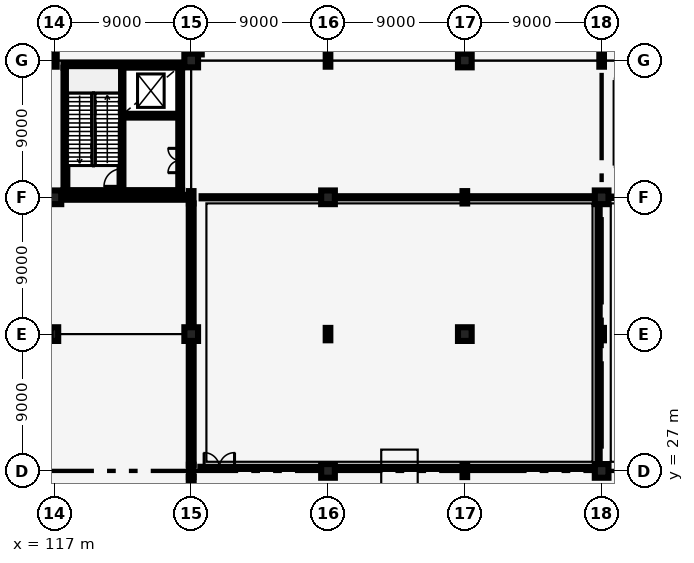
"""IFC4 building model, lengths in metres.
Left out: names, types, materials, properties, quantities, classifications, styles, units other than length and angle.
Written with IfcOpenShell. Run it as: python <this file> out.ifc"""

import sys

from ifc_helpers import new_model, si_unit, direction, frame, frame_2d, origin, origin_2d, place, context, subcontext, project, spatial, rectangle, i_section, extrude, element, fill, save


model = new_model("IFC4")
c1 = context("Model", 3, precision=1e-05, world=origin(), true_north=direction((0.0, 1.0)))
c2 = subcontext(c1, "Body", "Model", "MODEL_VIEW")
j1 = project(units=[si_unit("LENGTHUNIT", "METRE"), si_unit("PLANEANGLEUNIT", "RADIAN")], contexts=[c1])
p1 = place(None, origin())
s1 = spatial("IfcSite", under=j1, at=p1, CompositionType="ELEMENT")
p2 = place(p1, origin())
s2 = spatial("IfcBuilding", under=s1, at=p2, CompositionType="ELEMENT")
p3 = place(p2, origin())
s3 = spatial("IfcBuildingStorey", under=s2, at=p3, CompositionType="ELEMENT", Elevation=0.0)
p4 = place(p3, frame((117.0, 36.0, 0.0), z_axis=(0.0, 0.0, 1.0), x_axis=(1.0, 0.0, 0.0)))
e1 = element("IfcColumn", 1, at=p4, inside=s3, PredefinedType="PILASTER", context=c2, shape_type="SweptSolid", body=[
    extrude(rectangle(XDim=0.5, YDim=0.9, at=origin_2d()), origin(), (0.0, 0.0, 1.0), 5.735),
])
p5 = place(p3, frame((117.0, 45.0, 0.0), z_axis=(0.0, 0.0, 1.0), x_axis=(1.0, 0.0, 0.0)))
e2 = element("IfcColumn", 2, at=p5, inside=s3, PredefinedType="COLUMN", context=c2, shape_type="SweptSolid", body=[
    extrude(rectangle(XDim=0.9, YDim=0.9, at=origin_2d()), origin(), (0.0, 0.0, 1.0), 6.0),
])
for number, where, z_axis, x_axis in (
    (3, (117.0, 54.0, 0.0), (0.0, 0.0, 1.0), (1.0, 0.0, 0.0)),
    (4, (126.0, 27.0, 0.0), (0.0, 0.0, 1.0), (1.0, 0.0, 0.0)),
):
    element("IfcColumn", number, at=place(p3, frame(where, z_axis=z_axis, x_axis=x_axis)), inside=s3, PredefinedType="COLUMN", context=c2, shape_type="SweptSolid", body=[
        extrude(i_section(OverallWidth=0.303, OverallDepth=0.814, WebThickness=0.021, FlangeThickness=0.04, FilletRadius=0.03, at=origin_2d()), origin(), (0.0, 0.0, 1.0), 6.0),
    ])
p6 = place(p3, frame((126.0, 36.0, 0.0), z_axis=(0.0, 0.0, 1.0), x_axis=(1.0, 0.0, 0.0)))
e5 = element("IfcColumn", 5, at=p6, inside=s3, PredefinedType="COLUMN", context=c2, shape_type="SweptSolid", body=[
    extrude(rectangle(XDim=0.9, YDim=0.9, at=origin_2d()), origin(), (0.0, 0.0, 1.0), 6.0),
])
p7 = place(p3, frame((126.0, 45.0, 0.0), z_axis=(0.0, 0.0, 1.0), x_axis=(1.0, 0.0, 0.0)))
e6 = element("IfcColumn", 6, at=p7, inside=s3, PredefinedType="COLUMN", context=c2, shape_type="SweptSolid", body=[
    extrude(i_section(OverallWidth=0.303, OverallDepth=0.814, WebThickness=0.021, FlangeThickness=0.04, FilletRadius=0.03, at=origin_2d()), origin(), (0.0, 0.0, 1.0), 6.0),
])
for number, where, z_axis, x_axis in (
    (7, (126.0, 54.0, 0.0), (0.0, 0.0, 1.0), (1.0, 0.0, 0.0)),
    (8, (135.0, 27.0, 0.0), (0.0, 0.0, 1.0), (1.0, 0.0, 0.0)),
):
    element("IfcColumn", number, at=place(p3, frame(where, z_axis=z_axis, x_axis=x_axis)), inside=s3, PredefinedType="COLUMN", context=c2, shape_type="SweptSolid", body=[
        extrude(rectangle(XDim=0.9, YDim=0.9, at=origin_2d()), origin(), (0.0, 0.0, 1.0), 6.0),
    ])
p8 = place(p3, frame((135.0, 36.0, 0.0), z_axis=(0.0, 0.0, 1.0), x_axis=(1.0, 0.0, 0.0)))
e9 = element("IfcColumn", 9, at=p8, inside=s3, PredefinedType="COLUMN", context=c2, shape_type="SweptSolid", body=[
    extrude(i_section(OverallWidth=0.303, OverallDepth=0.814, WebThickness=0.021, FlangeThickness=0.04, FilletRadius=0.03, at=origin_2d()), origin(), (0.0, 0.0, 1.0), 6.0),
])
p9 = place(p3, frame((135.0, 45.0, 0.0), z_axis=(0.0, 0.0, 1.0), x_axis=(1.0, 0.0, 0.0)))
e10 = element("IfcColumn", 10, at=p9, inside=s3, PredefinedType="COLUMN", context=c2, shape_type="SweptSolid", body=[
    extrude(rectangle(XDim=0.9, YDim=0.9, at=origin_2d()), origin(), (0.0, 0.0, 1.0), 6.0),
])
for number, where, z_axis, x_axis in (
    (11, (135.0, 54.0, 0.0), (0.0, 0.0, 1.0), (1.0, 0.0, 0.0)),
    (12, (144.0, 27.0, 0.0), (0.0, 0.0, 1.0), (1.0, 0.0, 0.0)),
):
    element("IfcColumn", number, at=place(p3, frame(where, z_axis=z_axis, x_axis=x_axis)), inside=s3, PredefinedType="COLUMN", context=c2, shape_type="SweptSolid", body=[
        extrude(i_section(OverallWidth=0.303, OverallDepth=0.814, WebThickness=0.021, FlangeThickness=0.04, FilletRadius=0.03, at=origin_2d()), origin(), (0.0, 0.0, 1.0), 6.0),
    ])
p10 = place(p3, frame((144.0, 36.0, 0.0), z_axis=(0.0, 0.0, 1.0), x_axis=(1.0, 0.0, 0.0)))
e13 = element("IfcColumn", 13, at=p10, inside=s3, PredefinedType="COLUMN", context=c2, shape_type="SweptSolid", body=[
    extrude(rectangle(XDim=0.9, YDim=0.9, at=origin_2d()), origin(), (0.0, 0.0, 1.0), 6.0),
])
p11 = place(p3, frame((144.0, 45.0, 0.0), z_axis=(0.0, 0.0, 1.0), x_axis=(1.0, 0.0, 0.0)))
e14 = element("IfcColumn", 14, at=p11, inside=s3, PredefinedType="COLUMN", context=c2, shape_type="SweptSolid", body=[
    extrude(i_section(OverallWidth=0.303, OverallDepth=0.814, WebThickness=0.021, FlangeThickness=0.04, FilletRadius=0.03, at=origin_2d()), origin(), (0.0, 0.0, 1.0), 6.0),
])
for number, where, z_axis, x_axis in (
    (15, (144.0, 54.0, 0.0), (0.0, 0.0, 1.0), (1.0, 0.0, 0.0)),
    (16, (153.0, 27.0, 0.0), (0.0, 0.0, 1.0), (1.0, 0.0, 0.0)),
):
    element("IfcColumn", number, at=place(p3, frame(where, z_axis=z_axis, x_axis=x_axis)), inside=s3, PredefinedType="COLUMN", context=c2, shape_type="SweptSolid", body=[
        extrude(rectangle(XDim=0.9, YDim=0.9, at=origin_2d()), origin(), (0.0, 0.0, 1.0), 6.0),
    ])
p12 = place(p3, frame((153.0, 36.0, 0.0), z_axis=(0.0, 0.0, 1.0), x_axis=(1.0, 0.0, 0.0)))
e17 = element("IfcColumn", 17, at=p12, inside=s3, PredefinedType="COLUMN", context=c2, shape_type="SweptSolid", body=[
    extrude(i_section(OverallWidth=0.303, OverallDepth=0.814, WebThickness=0.021, FlangeThickness=0.04, FilletRadius=0.03, at=origin_2d()), origin(), (0.0, 0.0, 1.0), 6.0),
])
p13 = place(p3, frame((153.0, 45.0, 0.0), z_axis=(0.0, 0.0, 1.0), x_axis=(1.0, 0.0, 0.0)))
e18 = element("IfcColumn", 18, at=p13, inside=s3, PredefinedType="COLUMN", context=c2, shape_type="SweptSolid", body=[
    extrude(rectangle(XDim=0.9, YDim=0.9, at=origin_2d()), origin(), (0.0, 0.0, 1.0), 6.0),
])
p14 = place(p3, frame((153.0, 54.0, 0.0), z_axis=(0.0, 0.0, 1.0), x_axis=(1.0, 0.0, 0.0)))
e19 = element("IfcColumn", 19, at=p14, inside=s3, PredefinedType="COLUMN", context=c2, shape_type="SweptSolid", body=[
    extrude(i_section(OverallWidth=0.303, OverallDepth=0.814, WebThickness=0.021, FlangeThickness=0.04, FilletRadius=0.03, at=origin_2d()), origin(), (0.0, 0.0, 1.0), 6.0),
])
p15 = place(p3, frame((126.0, 18.445, 0.0), z_axis=(0.0, 0.0, 1.0), x_axis=(0.0, 1.0, 0.0)))
e20 = element("IfcWall", 20, at=p15, inside=s3, PredefinedType="SOLIDWALL", context=c2, shape_type="SweptSolid", body=[
    extrude(rectangle(XDim=8.153, YDim=0.32, at=frame_2d((4.076, 0.0))), origin(), (0.0, 0.0, 1.0), 4.95),
])
p16 = place(p15, frame((2.555, 0.0, 0.85)))
e21 = element("IfcOpeningElement", 21, at=p16, cuts=e20, PredefinedType="OPENING", context=c2, shape_type="SweptSolid", body=[
    extrude(rectangle(XDim=1.4, YDim=2.1, at=frame_2d((0.7, 1.05))), frame((0.0, 0.17, 0.0), z_axis=(0.0, -1.0, 0.0), x_axis=(1.0, 0.0, 0.0)), (0.0, 0.0, 1.0), 0.34),
])
p17 = place(p3, frame((126.0, 27.402, 0.0), z_axis=(0.0, 0.0, 1.0), x_axis=(0.0, 1.0, 0.0)))
e22 = element("IfcWall", 22, at=p17, inside=s3, PredefinedType="SOLIDWALL", context=c2, shape_type="SweptSolid", body=[
    extrude(rectangle(XDim=8.153, YDim=0.32, at=frame_2d((4.076, 0.0))), origin(), (0.0, 0.0, 1.0), 4.95),
])
p18 = place(p17, frame((2.598, 0.0, 0.85)))
e23 = element("IfcOpeningElement", 23, at=p18, cuts=e22, PredefinedType="OPENING", context=c2, shape_type="SweptSolid", body=[
    extrude(rectangle(XDim=2.7, YDim=1.8, at=frame_2d((1.35, 0.9))), frame((0.0, 0.17, 0.0), z_axis=(0.0, -1.0, 0.0), x_axis=(1.0, 0.0, 0.0)), (0.0, 0.0, 1.0), 0.34),
])
p19 = place(p3, frame((126.0, 36.445, 0.0), z_axis=(0.0, 0.0, 1.0), x_axis=(0.0, 1.0, 0.0)))
e24 = element("IfcWall", 24, at=p19, inside=s3, PredefinedType="SOLIDWALL", context=c2, shape_type="SweptSolid", body=[
    extrude(rectangle(XDim=8.153, YDim=0.32, at=frame_2d((4.076, 0.0))), origin(), (0.0, 0.0, 1.0), 4.95),
])
p20 = place(p19, frame((2.555, 0.0, 0.85)))
e25 = element("IfcOpeningElement", 25, at=p20, cuts=e24, PredefinedType="OPENING", context=c2, shape_type="SweptSolid", body=[
    extrude(rectangle(XDim=2.5, YDim=1.8, at=frame_2d((1.25, 0.9))), frame((0.0, 0.17, 0.0), z_axis=(0.0, -1.0, 0.0), x_axis=(1.0, 0.0, 0.0)), (0.0, 0.0, 1.0), 0.34),
])
p21 = place(p3, frame((117.445, 45.0, 0.0), z_axis=(0.0, 0.0, 1.0), x_axis=(1.0, 0.0, 0.0)))
e26 = element("IfcWall", 26, at=p21, inside=s3, PredefinedType="SOLIDWALL", context=c2, shape_type="SweptSolid", body=[
    extrude(rectangle(XDim=8.408, YDim=0.32, at=frame_2d((4.204, 0.0))), origin(), (0.0, 0.0, 1.0), 4.95),
])
p22 = place(p21, frame((2.505, 0.0, 3.3)))
e27 = element("IfcOpeningElement", 27, at=p22, cuts=e26, PredefinedType="OPENING", context=c2, shape_type="SweptSolid", body=[
    extrude(rectangle(XDim=3.1, YDim=1.3, at=frame_2d((1.55, 0.65))), frame((0.0, 0.17, 0.0), z_axis=(0.0, -1.0, 0.0), x_axis=(1.0, 0.0, 0.0)), (0.0, 0.0, 1.0), 0.34),
])
p23 = place(p3, frame((117.725, 45.47, 0.0), z_axis=(0.0, 0.0, 1.0), x_axis=(0.0, 1.0, 0.0)))
e28 = element("IfcWall", 28, at=p23, inside=s3, PredefinedType="SHEAR", context=c2, shape_type="SweptSolid", body=[
    extrude(rectangle(XDim=8.06, YDim=0.25, at=frame_2d((4.03, 0.0))), origin(), (0.0, 0.0, 1.0), 5.71),
])
p24 = place(p3, frame((125.275, 45.47, 0.0), z_axis=(0.0, 0.0, 1.0), x_axis=(0.0, 1.0, 0.0)))
e29 = element("IfcWall", 29, at=p24, inside=s3, PredefinedType="SHEAR", context=c2, shape_type="SweptSolid", body=[
    extrude(rectangle(XDim=8.06, YDim=0.25, at=frame_2d((4.03, 0.0))), origin(), (0.0, 0.0, 1.0), 5.71),
])
p25 = place(p24, frame((1.15, 0.0, 0.0)))
e30 = element("IfcOpeningElement", 30, at=p25, cuts=e29, PredefinedType="OPENING", context=c2, shape_type="SweptSolid", body=[
    extrude(rectangle(XDim=1.6, YDim=2.2, at=frame_2d((0.8, 1.1))), frame((0.0, 0.135, 0.0), z_axis=(0.0, -1.0, 0.0), x_axis=(1.0, 0.0, 0.0)), (0.0, 0.0, 1.0), 0.27),
])
for number, where, z_axis, x_axis in (
    (31, (117.6, 45.345, 0.0), (0.0, 0.0, 1.0), (1.0, 0.0, 0.0)),
    (32, (117.6, 53.655, 0.0), (0.0, 0.0, 1.0), (1.0, 0.0, 0.0)),
):
    element("IfcWall", number, at=place(p3, frame(where, z_axis=z_axis, x_axis=x_axis)), inside=s3, PredefinedType="SHEAR", context=c2, shape_type="SweptSolid", body=[
        extrude(rectangle(XDim=7.8, YDim=0.25, at=frame_2d((3.9, 0.0))), origin(), (0.0, 0.0, 1.0), 5.71),
    ])
p26 = place(p3, frame((121.415, 45.47, 0.0), z_axis=(0.0, 0.0, 1.0), x_axis=(0.0, 1.0, 0.0)))
e33 = element("IfcWall", 33, at=p26, inside=s3, PredefinedType="SHEAR", context=c2, shape_type="SweptSolid", body=[
    extrude(rectangle(XDim=8.06, YDim=0.25, at=frame_2d((4.03, 0.0))), origin(), (0.0, 0.0, 1.0), 5.71),
])
p27 = place(p26, frame((0.25, 0.0, 0.0)))
e34 = element("IfcOpeningElement", 34, at=p27, cuts=e33, PredefinedType="OPENING", context=c2, shape_type="SweptSolid", body=[
    extrude(rectangle(XDim=1.15, YDim=2.15, at=frame_2d((0.575, 1.075))), frame((0.0, 0.135, 0.0), z_axis=(0.0, -1.0, 0.0), x_axis=(1.0, 0.0, 0.0)), (0.0, 0.0, 1.0), 0.27),
])
p28 = place(p3, frame((121.54, 50.37, 0.0), z_axis=(0.0, 0.0, 1.0), x_axis=(1.0, 0.0, 0.0)))
e35 = element("IfcWall", 35, at=p28, inside=s3, PredefinedType="SHEAR", context=c2, shape_type="SweptSolid", body=[
    extrude(rectangle(XDim=3.61, YDim=0.25, at=frame_2d((1.805, 0.0))), origin(), (0.0, 0.0, 1.0), 5.71),
])
p29 = place(p28, frame((0.95, 0.0, 0.0)))
e36 = element("IfcOpeningElement", 36, at=p29, cuts=e35, PredefinedType="OPENING", context=c2, shape_type="SweptSolid", body=[
    extrude(rectangle(XDim=1.2, YDim=2.2, at=frame_2d((0.6, 1.1))), frame((0.0, 0.135, 0.0), z_axis=(0.0, -1.0, 0.0), x_axis=(1.0, 0.0, 0.0)), (0.0, 0.0, 1.0), 0.27),
])
p30 = place(p3, frame((126.6, 27.2, 0.0), z_axis=(0.0, 0.0, 1.0), x_axis=(1.0, 0.0, 0.0)))
e37 = element("IfcWall", 37, at=p30, inside=s3, PredefinedType="PARTITIONING", context=c2, shape_type="SweptSolid", body=[
    extrude(rectangle(XDim=26.2, YDim=0.14, at=frame_2d((13.1, 0.0))), origin(), (0.0, 0.0, 1.0), 4.85),
])
p31 = place(p30, frame((0.25, 0.0, 0.0)))
e38 = element("IfcOpeningElement", 38, at=p31, cuts=e37, PredefinedType="OPENING", context=c2, shape_type="SweptSolid", body=[
    extrude(rectangle(XDim=2.0, YDim=2.45, at=frame_2d((1.0, 1.225))), frame((0.0, 0.08, 0.0), z_axis=(0.0, -1.0, 0.0), x_axis=(1.0, 0.0, 0.0)), (0.0, 0.0, 1.0), 0.16),
])
p32 = place(p3, frame((126.684, 45.0, 0.0), z_axis=(0.0, 0.0, 1.0), x_axis=(1.0, 0.0, 0.0)))
e39 = element("IfcWall", 39, at=p32, inside=s3, PredefinedType="PARTITIONING", context=c2, shape_type="SweptSolid", body=[
    extrude(rectangle(XDim=26.032, YDim=0.14, at=frame_2d((13.016, 0.0))), origin(), (0.0, 0.0, 1.0), 4.85),
])
p33 = place(p3, frame((152.8, 27.284, 0.0), z_axis=(0.0, 0.0, 1.0), x_axis=(0.0, 1.0, 0.0)))
e40 = element("IfcWall", 40, at=p33, inside=s3, PredefinedType="PARTITIONING", context=c2, shape_type="SweptSolid", body=[
    extrude(rectangle(XDim=17.632, YDim=0.14, at=frame_2d((8.816, 0.0))), origin(), (0.0, 0.0, 1.0), 4.85),
])
p34 = place(p3, frame((153.2, 45.0, 0.0), z_axis=(0.0, 0.0, 1.0), x_axis=(1.0, 0.0, 0.0)))
e41 = element("IfcWall", 41, at=p34, inside=s3, PredefinedType="PARTITIONING", context=c2, shape_type="SweptSolid", body=[
    extrude(rectangle(XDim=38.2, YDim=0.095, at=frame_2d((19.1, 0.0))), origin(), (0.0, 0.0, 1.0), 4.85),
])
p35 = place(p34, frame((0.85, 0.0, 0.0)))
e42 = element("IfcOpeningElement", 42, at=p35, cuts=e41, PredefinedType="OPENING", context=c2, shape_type="SweptSolid", body=[
    extrude(rectangle(XDim=1.9, YDim=2.4, at=frame_2d((0.95, 1.2))), frame((0.0, 0.057, 0.0), z_axis=(0.0, -1.0, 0.0), x_axis=(1.0, 0.0, 0.0)), (0.0, 0.0, 1.0), 0.115),
])
p36 = place(p3, frame((126.6, 54.4, 0.0), z_axis=(0.0, 0.0, 1.0), x_axis=(0.0, 1.0, 0.0)))
e43 = element("IfcWall", 43, at=p36, inside=s3, PredefinedType="PARTITIONING", context=c2, shape_type="SweptSolid", body=[
    extrude(rectangle(XDim=17.6, YDim=0.185, at=frame_2d((8.8, 0.0))), origin(), (0.0, 0.0, 1.0), 4.85),
])
p37 = place(p36, frame((9.55, 0.0, 0.0)))
e44 = element("IfcOpeningElement", 44, at=p37, cuts=e43, PredefinedType="OPENING", context=c2, shape_type="SweptSolid", body=[
    extrude(rectangle(XDim=1.75, YDim=2.3, at=frame_2d((0.875, 1.15))), frame((0.0, 0.103, 0.0), z_axis=(0.0, -1.0, 0.0), x_axis=(1.0, 0.0, 0.0)), (0.0, 0.0, 1.0), 0.205),
])
p38 = place(p18, origin())
e45 = element("IfcWindow", 45, at=p38, inside=s3, PartitioningType="SINGLE_PANEL", PredefinedType="WINDOW", context=c2, shape_type="SweptSolid", body=[
    extrude(rectangle(XDim=2.7, YDim=1.8, at=frame_2d((1.35, 0.9))), frame((0.0, 0.03, 0.0), z_axis=(0.0, -1.0, 0.0), x_axis=(1.0, 0.0, 0.0)), (0.0, 0.0, 1.0), 0.06),
])
fill(e23, e45)
p39 = place(p20, origin())
e46 = element("IfcWindow", 46, at=p39, inside=s3, PartitioningType="SINGLE_PANEL", PredefinedType="WINDOW", context=c2, shape_type="SweptSolid", body=[
    extrude(rectangle(XDim=2.5, YDim=1.8, at=frame_2d((1.25, 0.9))), frame((0.0, 0.03, 0.0), z_axis=(0.0, -1.0, 0.0), x_axis=(1.0, 0.0, 0.0)), (0.0, 0.0, 1.0), 0.06),
])
fill(e25, e46)
p40 = place(p22, origin())
e47 = element("IfcWindow", 47, at=p40, inside=s3, PartitioningType="SINGLE_PANEL", PredefinedType="WINDOW", context=c2, shape_type="SweptSolid", body=[
    extrude(rectangle(XDim=3.1, YDim=1.3, at=frame_2d((1.55, 0.65))), frame((0.0, 0.03, 0.0), z_axis=(0.0, -1.0, 0.0), x_axis=(1.0, 0.0, 0.0)), (0.0, 0.0, 1.0), 0.06),
])
fill(e27, e47)
p41 = place(p27, origin())
e48 = element("IfcDoor", 48, at=p41, inside=s3, OperationType="SINGLE_SWING_LEFT", PredefinedType="DOOR", context=c2, shape_type="SweptSolid", body=[
    extrude(rectangle(XDim=1.15, YDim=2.15, at=frame_2d((0.575, 1.075))), frame((0.0, 0.025, 0.0), z_axis=(0.0, -1.0, 0.0), x_axis=(1.0, 0.0, 0.0)), (0.0, 0.0, 1.0), 0.05),
])
fill(e34, e48)
p42 = place(p29, origin())
e49 = element("IfcDoor", 49, at=p42, inside=s3, OperationType="DOUBLE_DOOR_SLIDING", PredefinedType="DOOR", context=c2, shape_type="SweptSolid", body=[
    extrude(rectangle(XDim=1.2, YDim=2.2, at=frame_2d((0.6, 1.1))), frame((0.0, 0.025, 0.0), z_axis=(0.0, -1.0, 0.0), x_axis=(1.0, 0.0, 0.0)), (0.0, 0.0, 1.0), 0.05),
])
fill(e36, e49)
p43 = place(p25, origin())
e50 = element("IfcDoor", 50, at=p43, inside=s3, OperationType="DOUBLE_DOOR_SINGLE_SWING", PredefinedType="DOOR", context=c2, shape_type="SweptSolid", body=[
    extrude(rectangle(XDim=1.6, YDim=2.2, at=frame_2d((0.8, 1.1))), frame((0.0, 0.025, 0.0), z_axis=(0.0, -1.0, 0.0), x_axis=(1.0, 0.0, 0.0)), (0.0, 0.0, 1.0), 0.05),
])
fill(e30, e50)
p44 = place(p31, origin())
e51 = element("IfcDoor", 51, at=p44, inside=s3, OperationType="DOUBLE_DOOR_SINGLE_SWING", PredefinedType="DOOR", context=c2, shape_type="SweptSolid", body=[
    extrude(rectangle(XDim=2.0, YDim=2.45, at=frame_2d((1.0, 1.225))), frame((0.0, 0.025, 0.0), z_axis=(0.0, -1.0, 0.0), x_axis=(1.0, 0.0, 0.0)), (0.0, 0.0, 1.0), 0.05),
])
fill(e38, e51)
save(model, sys.argv[1])
